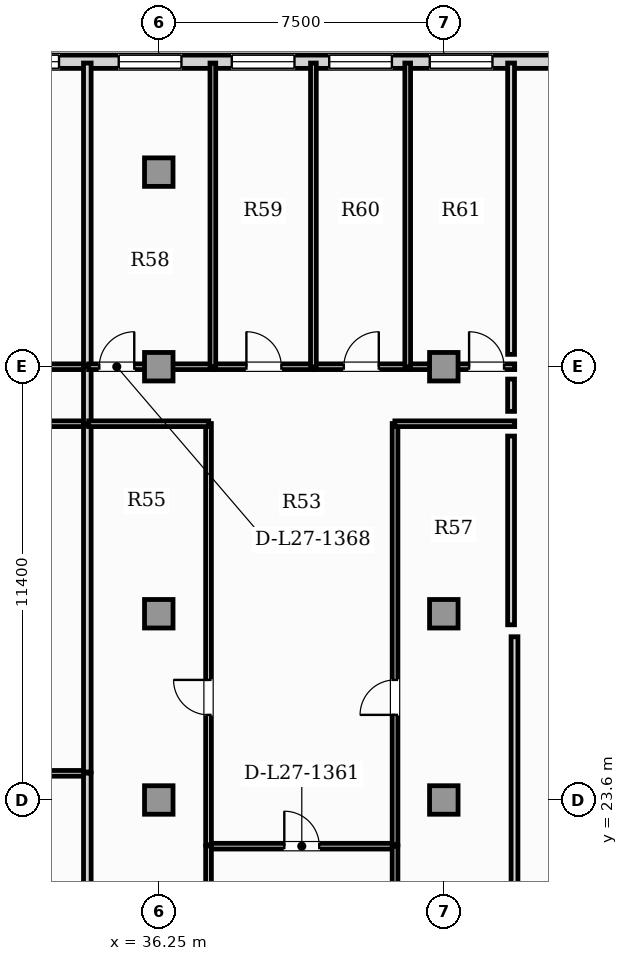
"""IFC4 building model, lengths in metres.
Left out: names, types, materials, properties, quantities, classifications, styles, units other than length and angle.
Written with IfcOpenShell. Run it as: python <this file> out.ifc"""

import sys

from ifc_helpers import new_model, si_unit, direction, frame, frame_2d, origin, origin_2d, place, context, subcontext, project, spatial, rectangle, extrude, element, fill, save


model = new_model("IFC4")
c1 = context("Model", 3, precision=1e-05, world=origin(), true_north=direction((0.0, 1.0)))
c2 = subcontext(c1, "Body", "Model", "MODEL_VIEW")
j1 = project(units=[si_unit("LENGTHUNIT", "METRE"), si_unit("PLANEANGLEUNIT", "RADIAN")], contexts=[c1])
p1 = place(None, origin())
s1 = spatial("IfcSite", under=j1, at=p1, CompositionType="ELEMENT")
p2 = place(p1, origin())
s2 = spatial("IfcBuilding", under=s1, at=p2, CompositionType="ELEMENT")
p3 = place(p2, frame((0.0, 0.0, 111.85)))
s3 = spatial("IfcBuildingStorey", under=s2, at=p3, CompositionType="ELEMENT", Elevation=111.85)
for number, where, z_axis, x_axis in (
    (1, (36.25, 23.6, 0.0), (0.0, 0.0, 1.0), (1.0, 0.0, 0.0)),
    (2, (43.75, 23.6, 0.0), (0.0, 0.0, 1.0), (1.0, 0.0, 0.0)),
    (3, (36.25, 28.5, 0.0), (0.0, 0.0, 1.0), (1.0, 0.0, 0.0)),
    (4, (43.75, 28.5, 0.0), (0.0, 0.0, 1.0), (1.0, 0.0, 0.0)),
    (5, (36.25, 40.12, 0.0), (0.0, 0.0, 1.0), (1.0, 0.0, 0.0)),
    (6, (36.25, 35.0, 0.0), (0.0, 0.0, 1.0), (1.0, 0.0, 0.0)),
    (7, (43.75, 35.0, 0.0), (0.0, 0.0, 1.0), (1.0, 0.0, 0.0)),
):
    element("IfcColumn", number, at=place(p3, frame(where, z_axis=z_axis, x_axis=x_axis)), inside=s3, PredefinedType="COLUMN", context=c2, shape_type="SweptSolid", body=[
        extrude(rectangle(XDim=0.75, YDim=0.75, at=origin_2d()), origin(), (0.0, 0.0, 1.0), 3.85),
    ])
p4 = place(p3, frame((51.66, 43.025, 0.0), z_axis=(0.0, 0.0, 1.0), x_axis=(-1.0, 0.0, 0.0)))
e8 = element("IfcWall", 8, at=p4, inside=s3, PredefinedType="SOLIDWALL", context=c2, shape_type="SweptSolid", body=[
    extrude(rectangle(XDim=45.82, YDim=0.35, at=frame_2d((22.91, 0.0))), origin(), (0.0, 0.0, 1.0), 3.6),
])
p5 = place(p4, frame((42.393, 0.0, 0.88)))
e9 = element("IfcOpeningElement", 9, at=p5, cuts=e8, PredefinedType="OPENING", context=c2, shape_type="SweptSolid", body=[
    extrude(rectangle(XDim=1.65, YDim=2.0, at=frame_2d((0.825, 1.0))), frame((0.0, 0.185, 0.0), z_axis=(0.0, -1.0, 0.0), x_axis=(1.0, 0.0, 0.0)), (0.0, 0.0, 1.0), 0.37),
])
p6 = place(p4, frame((1.778, 0.0, 0.88)))
e10 = element("IfcOpeningElement", 10, at=p6, cuts=e8, PredefinedType="OPENING", context=c2, shape_type="SweptSolid", body=[
    extrude(rectangle(XDim=1.65, YDim=2.0, at=frame_2d((0.825, 1.0))), frame((0.0, 0.185, 0.0), z_axis=(0.0, -1.0, 0.0), x_axis=(1.0, 0.0, 0.0)), (0.0, 0.0, 1.0), 0.37),
])
p7 = place(p4, frame((37.293, 0.0, 0.88)))
e11 = element("IfcOpeningElement", 11, at=p7, cuts=e8, PredefinedType="OPENING", context=c2, shape_type="SweptSolid", body=[
    extrude(rectangle(XDim=1.65, YDim=2.0, at=frame_2d((0.825, 1.0))), frame((0.0, 0.185, 0.0), z_axis=(0.0, -1.0, 0.0), x_axis=(1.0, 0.0, 0.0)), (0.0, 0.0, 1.0), 0.37),
])
p8 = place(p4, frame((34.694, 0.0, 0.95)))
e12 = element("IfcOpeningElement", 12, at=p8, cuts=e8, PredefinedType="OPENING", context=c2, shape_type="SweptSolid", body=[
    extrude(rectangle(XDim=0.9, YDim=1.5, at=frame_2d((0.45, 0.75))), frame((0.0, 0.185, 0.0), z_axis=(0.0, -1.0, 0.0), x_axis=(1.0, 0.0, 0.0)), (0.0, 0.0, 1.0), 0.37),
])
p9 = place(p4, frame((31.734, 0.0, 1.82)))
e13 = element("IfcOpeningElement", 13, at=p9, cuts=e8, PredefinedType="OPENING", context=c2, shape_type="SweptSolid", body=[
    extrude(rectangle(XDim=0.9, YDim=1.05, at=frame_2d((0.45, 0.525))), frame((0.0, 0.185, 0.0), z_axis=(0.0, -1.0, 0.0), x_axis=(1.0, 0.0, 0.0)), (0.0, 0.0, 1.0), 0.37),
])
p10 = place(p4, frame((29.11, 0.0, 0.88)))
e14 = element("IfcOpeningElement", 14, at=p10, cuts=e8, PredefinedType="OPENING", context=c2, shape_type="SweptSolid", body=[
    extrude(rectangle(XDim=1.65, YDim=2.0, at=frame_2d((0.825, 1.0))), frame((0.0, 0.185, 0.0), z_axis=(0.0, -1.0, 0.0), x_axis=(1.0, 0.0, 0.0)), (0.0, 0.0, 1.0), 0.37),
])
p11 = place(p4, frame((26.053, 0.0, 0.88)))
e15 = element("IfcOpeningElement", 15, at=p11, cuts=e8, PredefinedType="OPENING", context=c2, shape_type="SweptSolid", body=[
    extrude(rectangle(XDim=1.65, YDim=2.0, at=frame_2d((0.825, 1.0))), frame((0.0, 0.185, 0.0), z_axis=(0.0, -1.0, 0.0), x_axis=(1.0, 0.0, 0.0)), (0.0, 0.0, 1.0), 0.37),
])
p12 = place(p4, frame((23.243, 0.0, 0.88)))
e16 = element("IfcOpeningElement", 16, at=p12, cuts=e8, PredefinedType="OPENING", context=c2, shape_type="SweptSolid", body=[
    extrude(rectangle(XDim=1.65, YDim=2.0, at=frame_2d((0.825, 1.0))), frame((0.0, 0.185, 0.0), z_axis=(0.0, -1.0, 0.0), x_axis=(1.0, 0.0, 0.0)), (0.0, 0.0, 1.0), 0.37),
])
p13 = place(p4, frame((20.844, 0.0, 0.88)))
e17 = element("IfcOpeningElement", 17, at=p13, cuts=e8, PredefinedType="OPENING", context=c2, shape_type="SweptSolid", body=[
    extrude(rectangle(XDim=1.65, YDim=2.0, at=frame_2d((0.825, 1.0))), frame((0.0, 0.185, 0.0), z_axis=(0.0, -1.0, 0.0), x_axis=(1.0, 0.0, 0.0)), (0.0, 0.0, 1.0), 0.37),
])
p14 = place(p4, frame((18.034, 0.0, 0.88)))
e18 = element("IfcOpeningElement", 18, at=p14, cuts=e8, PredefinedType="OPENING", context=c2, shape_type="SweptSolid", body=[
    extrude(rectangle(XDim=1.65, YDim=2.0, at=frame_2d((0.825, 1.0))), frame((0.0, 0.185, 0.0), z_axis=(0.0, -1.0, 0.0), x_axis=(1.0, 0.0, 0.0)), (0.0, 0.0, 1.0), 0.37),
])
p15 = place(p4, frame((14.813, 0.0, 0.88)))
e19 = element("IfcOpeningElement", 19, at=p15, cuts=e8, PredefinedType="OPENING", context=c2, shape_type="SweptSolid", body=[
    extrude(rectangle(XDim=1.65, YDim=2.0, at=frame_2d((0.825, 1.0))), frame((0.0, 0.185, 0.0), z_axis=(0.0, -1.0, 0.0), x_axis=(1.0, 0.0, 0.0)), (0.0, 0.0, 1.0), 0.37),
])
p16 = place(p4, frame((11.839, 0.0, 0.88)))
e20 = element("IfcOpeningElement", 20, at=p16, cuts=e8, PredefinedType="OPENING", context=c2, shape_type="SweptSolid", body=[
    extrude(rectangle(XDim=1.65, YDim=2.0, at=frame_2d((0.825, 1.0))), frame((0.0, 0.185, 0.0), z_axis=(0.0, -1.0, 0.0), x_axis=(1.0, 0.0, 0.0)), (0.0, 0.0, 1.0), 0.37),
])
p17 = place(p4, frame((9.276, 0.0, 0.88)))
e21 = element("IfcOpeningElement", 21, at=p17, cuts=e8, PredefinedType="OPENING", context=c2, shape_type="SweptSolid", body=[
    extrude(rectangle(XDim=1.65, YDim=2.0, at=frame_2d((0.825, 1.0))), frame((0.0, 0.185, 0.0), z_axis=(0.0, -1.0, 0.0), x_axis=(1.0, 0.0, 0.0)), (0.0, 0.0, 1.0), 0.37),
])
p18 = place(p4, frame((6.63, 0.0, 0.88)))
e22 = element("IfcOpeningElement", 22, at=p18, cuts=e8, PredefinedType="OPENING", context=c2, shape_type="SweptSolid", body=[
    extrude(rectangle(XDim=1.65, YDim=2.0, at=frame_2d((0.825, 1.0))), frame((0.0, 0.185, 0.0), z_axis=(0.0, -1.0, 0.0), x_axis=(1.0, 0.0, 0.0)), (0.0, 0.0, 1.0), 0.37),
])
p19 = place(p3, frame((45.61, 17.225, 0.0), z_axis=(0.0, 0.0, 1.0), x_axis=(0.0, 1.0, 0.0)))
e23 = element("IfcWall", 23, at=p19, inside=s3, PredefinedType="PARTITIONING", context=c2, shape_type="SweptSolid", body=[
    extrude(rectangle(XDim=10.67, YDim=0.18, at=frame_2d((5.335, 0.0))), origin(), (0.0, 0.0, 1.0), 3.6),
])
p20 = place(p3, frame((31.153, 33.5, 0.0), z_axis=(0.0, 0.0, 1.0), x_axis=(1.0, 0.0, 0.0)))
e24 = element("IfcWall", 24, at=p20, inside=s3, PredefinedType="PARTITIONING", context=c2, shape_type="SweptSolid", body=[
    extrude(rectangle(XDim=3.222, YDim=0.15, at=frame_2d((1.611, 0.0))), origin(), (0.0, 0.0, 1.0), 3.6),
])
p21 = place(p3, frame((31.266, 35.0, 0.0), z_axis=(0.0, 0.0, 1.0), x_axis=(1.0, 0.0, 0.0)))
e25 = element("IfcWall", 25, at=p21, inside=s3, PredefinedType="PARTITIONING", context=c2, shape_type="SweptSolid", body=[
    extrude(rectangle(XDim=3.109, YDim=0.15, at=frame_2d((1.554, 0.0))), origin(), (0.0, 0.0, 1.0), 2.983),
])
p22 = place(p21, frame((1.094, 0.0, 0.0)))
e26 = element("IfcOpeningElement", 26, at=p22, cuts=e25, PredefinedType="OPENING", context=c2, shape_type="SweptSolid", body=[
    extrude(rectangle(XDim=0.92, YDim=2.1, at=frame_2d((0.46, 1.05))), frame((0.0, 0.085, 0.0), z_axis=(0.0, -1.0, 0.0), x_axis=(1.0, 0.0, 0.0)), (0.0, 0.0, 1.0), 0.17),
])
p23 = place(p3, frame((34.37, 33.495, 0.0), z_axis=(0.0, 0.0, 1.0), x_axis=(0.0, 1.0, 0.0)))
e27 = element("IfcWall", 27, at=p23, inside=s3, PredefinedType="PARTITIONING", context=c2, shape_type="SweptSolid", body=[
    extrude(rectangle(XDim=1.51, YDim=0.2, at=frame_2d((0.755, 0.0))), origin(), (0.0, 0.0, 1.0), 3.6),
])
p24 = place(p3, frame((31.153, 24.301, 0.0), z_axis=(0.0, 0.0, 1.0), x_axis=(1.0, 0.0, 0.0)))
e28 = element("IfcWall", 28, at=p24, inside=s3, PredefinedType="PARTITIONING", context=c2, shape_type="SweptSolid", body=[
    extrude(rectangle(XDim=3.222, YDim=0.15, at=frame_2d((1.611, 0.0))), origin(), (0.0, 0.0, 1.0), 3.6),
])
p25 = place(p3, frame((34.37, 17.151, 0.0), z_axis=(0.0, 0.0, 1.0), x_axis=(0.0, 1.0, 0.0)))
e29 = element("IfcWall", 29, at=p25, inside=s3, PredefinedType="PARTITIONING", context=c2, shape_type="SweptSolid", body=[
    extrude(rectangle(XDim=7.155, YDim=0.2, at=frame_2d((3.578, 0.0))), origin(), (0.0, 0.0, 1.0), 3.6),
])
p26 = place(p3, frame((34.37, 24.336, 0.0), z_axis=(0.0, 0.0, 1.0), x_axis=(0.0, 1.0, 0.0)))
e30 = element("IfcWall", 30, at=p26, inside=s3, PredefinedType="PARTITIONING", context=c2, shape_type="SweptSolid", body=[
    extrude(rectangle(XDim=9.129, YDim=0.2, at=frame_2d((4.564, 0.0))), origin(), (0.0, 0.0, 1.0), 3.6),
])
p27 = place(p3, frame((34.37, 35.035, 0.0), z_axis=(0.0, 0.0, 1.0), x_axis=(0.0, 1.0, 0.0)))
e31 = element("IfcWall", 31, at=p27, inside=s3, PredefinedType="PARTITIONING", context=c2, shape_type="SweptSolid", body=[
    extrude(rectangle(XDim=7.955, YDim=0.2, at=frame_2d((3.978, 0.0))), origin(), (0.0, 0.0, 1.0), 3.6),
])
p28 = place(p3, frame((37.554, 22.385, 0.0), z_axis=(0.0, 0.0, 1.0), x_axis=(1.0, 0.0, 0.0)))
e32 = element("IfcWall", 32, at=p28, inside=s3, PredefinedType="PARTITIONING", context=c2, shape_type="SweptSolid", body=[
    extrude(rectangle(XDim=4.917, YDim=0.15, at=frame_2d((2.459, 0.0))), origin(), (0.0, 0.0, 1.0), 3.6),
])
p29 = place(p28, frame((1.999, 0.0, 0.0)))
e33 = element("IfcOpeningElement", 33, at=p29, cuts=e32, PredefinedType="OPENING", context=c2, shape_type="SweptSolid", body=[
    extrude(rectangle(XDim=0.92, YDim=2.1, at=frame_2d((0.46, 1.05))), frame((0.0, 0.085, 0.0), z_axis=(0.0, -1.0, 0.0), x_axis=(1.0, 0.0, 0.0)), (0.0, 0.0, 1.0), 0.17),
])
p30 = place(p3, frame((37.559, 16.178, 0.0), z_axis=(0.0, 0.0, 1.0), x_axis=(0.0, 1.0, 0.0)))
e34 = element("IfcWall", 34, at=p30, inside=s3, PredefinedType="PARTITIONING", context=c2, shape_type="SweptSolid", body=[
    extrude(rectangle(XDim=6.211, YDim=0.15, at=frame_2d((3.105, 0.0))), origin(), (0.0, 0.0, 1.0), 3.6),
])
p31 = place(p30, frame((2.646, 0.0, 0.0)))
e35 = element("IfcOpeningElement", 35, at=p31, cuts=e34, PredefinedType="OPENING", context=c2, shape_type="SweptSolid", body=[
    extrude(rectangle(XDim=0.92, YDim=2.1, at=frame_2d((0.46, 1.05))), frame((0.0, 0.085, 0.0), z_axis=(0.0, -1.0, 0.0), x_axis=(1.0, 0.0, 0.0)), (0.0, 0.0, 1.0), 0.17),
])
p32 = place(p3, frame((42.467, 17.225, 0.0), z_axis=(0.0, 0.0, 1.0), x_axis=(0.0, 1.0, 0.0)))
e36 = element("IfcWall", 36, at=p32, inside=s3, PredefinedType="PARTITIONING", context=c2, shape_type="SweptSolid", body=[
    extrude(rectangle(XDim=5.165, YDim=0.15, at=frame_2d((2.583, 0.0))), origin(), (0.0, 0.0, 1.0), 3.6),
])
p33 = place(p32, frame((2.122, 0.0, 0.0)))
e37 = element("IfcOpeningElement", 37, at=p33, cuts=e36, PredefinedType="OPENING", context=c2, shape_type="SweptSolid", body=[
    extrude(rectangle(XDim=0.92, YDim=2.1, at=frame_2d((0.46, 1.05))), frame((0.0, 0.085, 0.0), z_axis=(0.0, -1.0, 0.0), x_axis=(1.0, 0.0, 0.0)), (0.0, 0.0, 1.0), 0.17),
])
p34 = place(p3, frame((37.559, 22.419, 0.0), z_axis=(0.0, 0.0, 1.0), x_axis=(0.0, 1.0, 0.0)))
e38 = element("IfcWall", 38, at=p34, inside=s3, PredefinedType="PARTITIONING", context=c2, shape_type="SweptSolid", body=[
    extrude(rectangle(XDim=11.085, YDim=0.15, at=frame_2d((5.543, 0.0))), origin(), (0.0, 0.0, 1.0), 3.6),
])
p35 = place(p34, frame((3.42, 0.0, 0.0)))
e39 = element("IfcOpeningElement", 39, at=p35, cuts=e38, PredefinedType="OPENING", context=c2, shape_type="SweptSolid", body=[
    extrude(rectangle(XDim=0.92, YDim=2.1, at=frame_2d((0.46, 1.05))), frame((0.0, 0.085, 0.0), z_axis=(0.0, -1.0, 0.0), x_axis=(1.0, 0.0, 0.0)), (0.0, 0.0, 1.0), 0.17),
])
p36 = place(p3, frame((34.405, 33.5, 0.0), z_axis=(0.0, 0.0, 1.0), x_axis=(1.0, 0.0, 0.0)))
e40 = element("IfcWall", 40, at=p36, inside=s3, PredefinedType="PARTITIONING", context=c2, shape_type="SweptSolid", body=[
    extrude(rectangle(XDim=3.159, YDim=0.15, at=frame_2d((1.58, 0.0))), origin(), (0.0, 0.0, 1.0), 3.6),
])
p37 = place(p3, frame((42.467, 22.419, 0.0), z_axis=(0.0, 0.0, 1.0), x_axis=(0.0, 1.0, 0.0)))
e41 = element("IfcWall", 41, at=p37, inside=s3, PredefinedType="PARTITIONING", context=c2, shape_type="SweptSolid", body=[
    extrude(rectangle(XDim=11.085, YDim=0.15, at=frame_2d((5.543, 0.0))), origin(), (0.0, 0.0, 1.0), 3.6),
])
p38 = place(p37, frame((3.42, 0.0, 0.0)))
e42 = element("IfcOpeningElement", 42, at=p38, cuts=e41, PredefinedType="OPENING", context=c2, shape_type="SweptSolid", body=[
    extrude(rectangle(XDim=0.92, YDim=2.1, at=frame_2d((0.46, 1.05))), frame((0.0, 0.085, 0.0), z_axis=(0.0, -1.0, 0.0), x_axis=(1.0, 0.0, 0.0)), (0.0, 0.0, 1.0), 0.17),
])
p39 = place(p3, frame((42.462, 33.5, 0.0), z_axis=(0.0, 0.0, 1.0), x_axis=(1.0, 0.0, 0.0)))
e43 = element("IfcWall", 43, at=p39, inside=s3, PredefinedType="PARTITIONING", context=c2, shape_type="SweptSolid", body=[
    extrude(rectangle(XDim=3.153, YDim=0.15, at=frame_2d((1.577, 0.0))), origin(), (0.0, 0.0, 1.0), 3.6),
])
p40 = place(p3, frame((34.405, 35.0, 0.0), z_axis=(0.0, 0.0, 1.0), x_axis=(1.0, 0.0, 0.0)))
e44 = element("IfcWall", 44, at=p40, inside=s3, PredefinedType="PARTITIONING", context=c2, shape_type="SweptSolid", body=[
    extrude(rectangle(XDim=3.273, YDim=0.15, at=frame_2d((1.636, 0.0))), origin(), (0.0, 0.0, 1.0), 2.983),
])
p41 = place(p40, frame((0.28, 0.0, 0.0)))
e45 = element("IfcOpeningElement", 45, at=p41, cuts=e44, PredefinedType="OPENING", context=c2, shape_type="SweptSolid", body=[
    extrude(rectangle(XDim=0.92, YDim=2.1, at=frame_2d((0.46, 1.05))), frame((0.0, 0.085, 0.0), z_axis=(0.0, -1.0, 0.0), x_axis=(1.0, 0.0, 0.0)), (0.0, 0.0, 1.0), 0.17),
])
p42 = place(p3, frame((37.708, 35.0, 0.0), z_axis=(0.0, 0.0, 1.0), x_axis=(1.0, 0.0, 0.0)))
e46 = element("IfcWall", 46, at=p42, inside=s3, PredefinedType="PARTITIONING", context=c2, shape_type="SweptSolid", body=[
    extrude(rectangle(XDim=2.616, YDim=0.15, at=frame_2d((1.308, 0.0))), origin(), (0.0, 0.0, 1.0), 2.983),
])
p43 = place(p42, frame((0.848, 0.0, 0.0)))
e47 = element("IfcOpeningElement", 47, at=p43, cuts=e46, PredefinedType="OPENING", context=c2, shape_type="SweptSolid", body=[
    extrude(rectangle(XDim=0.92, YDim=2.1, at=frame_2d((0.46, 1.05))), frame((0.0, 0.085, 0.0), z_axis=(0.0, -1.0, 0.0), x_axis=(1.0, 0.0, 0.0)), (0.0, 0.0, 1.0), 0.17),
])
p44 = place(p3, frame((40.354, 35.0, 0.0), z_axis=(0.0, 0.0, 1.0), x_axis=(1.0, 0.0, 0.0)))
e48 = element("IfcWall", 48, at=p44, inside=s3, PredefinedType="PARTITIONING", context=c2, shape_type="SweptSolid", body=[
    extrude(rectangle(XDim=2.451, YDim=0.15, at=frame_2d((1.226, 0.0))), origin(), (0.0, 0.0, 1.0), 2.983),
])
p45 = place(p44, frame((0.766, 0.0, 0.0)))
e49 = element("IfcOpeningElement", 49, at=p45, cuts=e48, PredefinedType="OPENING", context=c2, shape_type="SweptSolid", body=[
    extrude(rectangle(XDim=0.92, YDim=2.1, at=frame_2d((0.46, 1.05))), frame((0.0, 0.085, 0.0), z_axis=(0.0, -1.0, 0.0), x_axis=(1.0, 0.0, 0.0)), (0.0, 0.0, 1.0), 0.17),
])
p46 = place(p3, frame((42.835, 35.0, 0.0), z_axis=(0.0, 0.0, 1.0), x_axis=(1.0, 0.0, 0.0)))
e50 = element("IfcWall", 50, at=p46, inside=s3, PredefinedType="PARTITIONING", context=c2, shape_type="SweptSolid", body=[
    extrude(rectangle(XDim=2.78, YDim=0.15, at=frame_2d((1.39, 0.0))), origin(), (0.0, 0.0, 1.0), 2.983),
])
p47 = place(p46, frame((1.58, 0.0, 0.0)))
e51 = element("IfcOpeningElement", 51, at=p47, cuts=e50, PredefinedType="OPENING", context=c2, shape_type="SweptSolid", body=[
    extrude(rectangle(XDim=0.92, YDim=2.1, at=frame_2d((0.46, 1.05))), frame((0.0, 0.085, 0.0), z_axis=(0.0, -1.0, 0.0), x_axis=(1.0, 0.0, 0.0)), (0.0, 0.0, 1.0), 0.17),
])
for number, where, z_axis, x_axis in (
    (52, (37.673, 34.995, 0.0), (0.0, 0.0, 1.0), (0.0, 1.0, 0.0)),
    (53, (40.319, 34.995, 0.0), (0.0, 0.0, 1.0), (0.0, 1.0, 0.0)),
    (54, (42.8, 34.995, 0.0), (0.0, 0.0, 1.0), (0.0, 1.0, 0.0)),
):
    element("IfcWall", number, at=place(p3, frame(where, z_axis=z_axis, x_axis=x_axis)), inside=s3, PredefinedType="PARTITIONING", context=c2, shape_type="SweptSolid", body=[
        extrude(rectangle(XDim=7.995, YDim=0.15, at=frame_2d((3.998, 0.0))), origin(), (0.0, 0.0, 1.0), 3.6),
    ])
p48 = place(p3, frame((45.52, 34.675, 0.0), z_axis=(0.0, 0.0, 1.0), x_axis=(0.0, -1.0, 0.0)))
e55 = element("IfcWall", 55, at=p48, inside=s3, PredefinedType="PARTITIONING", context=c2, shape_type="SweptSolid", body=[
    extrude(rectangle(XDim=0.85, YDim=0.18, at=frame_2d((0.425, 0.0))), origin(), (0.0, 0.0, 1.0), 3.6),
])
p49 = place(p3, frame((45.52, 33.175, 0.0), z_axis=(0.0, 0.0, 1.0), x_axis=(0.0, -1.0, 0.0)))
e56 = element("IfcWall", 56, at=p49, inside=s3, PredefinedType="PARTITIONING", context=c2, shape_type="SweptSolid", body=[
    extrude(rectangle(XDim=4.965, YDim=0.18, at=frame_2d((2.482, 0.0))), origin(), (0.0, 0.0, 1.0), 3.6),
])
p50 = place(p3, frame((45.52, 42.99, 0.0), z_axis=(0.0, 0.0, 1.0), x_axis=(0.0, -1.0, 0.0)))
e57 = element("IfcWall", 57, at=p50, inside=s3, PredefinedType="PARTITIONING", context=c2, shape_type="SweptSolid", body=[
    extrude(rectangle(XDim=7.665, YDim=0.18, at=frame_2d((3.833, 0.0))), origin(), (0.0, 0.0, 1.0), 3.6),
])
p51 = place(p14, origin())
e58 = element("IfcWindow", 58, at=p51, inside=s3, PartitioningType="SINGLE_PANEL", PredefinedType="WINDOW", context=c2, shape_type="SweptSolid", body=[
    extrude(rectangle(XDim=1.65, YDim=2.0, at=frame_2d((0.825, 1.0))), frame((0.0, 0.03, 0.0), z_axis=(0.0, -1.0, 0.0), x_axis=(1.0, 0.0, 0.0)), (0.0, 0.0, 1.0), 0.06),
])
fill(e18, e58)
p52 = place(p15, origin())
e59 = element("IfcWindow", 59, at=p52, inside=s3, PartitioningType="SINGLE_PANEL", PredefinedType="WINDOW", context=c2, shape_type="SweptSolid", body=[
    extrude(rectangle(XDim=1.65, YDim=2.0, at=frame_2d((0.825, 1.0))), frame((0.0, 0.03, 0.0), z_axis=(0.0, -1.0, 0.0), x_axis=(1.0, 0.0, 0.0)), (0.0, 0.0, 1.0), 0.06),
])
fill(e19, e59)
p53 = place(p16, origin())
e60 = element("IfcWindow", 60, at=p53, inside=s3, PartitioningType="SINGLE_PANEL", PredefinedType="WINDOW", context=c2, shape_type="SweptSolid", body=[
    extrude(rectangle(XDim=1.65, YDim=2.0, at=frame_2d((0.825, 1.0))), frame((0.0, 0.03, 0.0), z_axis=(0.0, -1.0, 0.0), x_axis=(1.0, 0.0, 0.0)), (0.0, 0.0, 1.0), 0.06),
])
fill(e20, e60)
p54 = place(p17, origin())
e61 = element("IfcWindow", 61, at=p54, inside=s3, PartitioningType="SINGLE_PANEL", PredefinedType="WINDOW", context=c2, shape_type="SweptSolid", body=[
    extrude(rectangle(XDim=1.65, YDim=2.0, at=frame_2d((0.825, 1.0))), frame((0.0, 0.03, 0.0), z_axis=(0.0, -1.0, 0.0), x_axis=(1.0, 0.0, 0.0)), (0.0, 0.0, 1.0), 0.06),
])
fill(e21, e61)
p55 = place(p18, origin())
e62 = element("IfcWindow", 62, at=p55, inside=s3, PartitioningType="SINGLE_PANEL", PredefinedType="WINDOW", context=c2, shape_type="SweptSolid", body=[
    extrude(rectangle(XDim=1.65, YDim=2.0, at=frame_2d((0.825, 1.0))), frame((0.0, 0.03, 0.0), z_axis=(0.0, -1.0, 0.0), x_axis=(1.0, 0.0, 0.0)), (0.0, 0.0, 1.0), 0.06),
])
fill(e22, e62)
p56 = place(p29, origin())
e63 = element("IfcDoor", 63, at=p56, inside=s3, OperationType="SINGLE_SWING_LEFT", PredefinedType="DOOR", context=c2, shape_type="SweptSolid", body=[
    extrude(rectangle(XDim=0.92, YDim=2.1, at=frame_2d((0.46, 1.05))), frame((0.0, 0.025, 0.0), z_axis=(0.0, -1.0, 0.0), x_axis=(1.0, 0.0, 0.0)), (0.0, 0.0, 1.0), 0.05),
])
fill(e33, e63)
p57 = place(p35, origin())
e64 = element("IfcDoor", 64, at=p57, inside=s3, OperationType="SINGLE_SWING_RIGHT", PredefinedType="DOOR", context=c2, shape_type="SweptSolid", body=[
    extrude(rectangle(XDim=0.92, YDim=2.1, at=frame_2d((0.46, 1.05))), frame((0.0, 0.025, 0.0), z_axis=(0.0, -1.0, 0.0), x_axis=(1.0, 0.0, 0.0)), (0.0, 0.0, 1.0), 0.05),
])
fill(e39, e64)
p58 = place(p38, origin())
e65 = element("IfcDoor", 65, at=p58, inside=s3, OperationType="SINGLE_SWING_LEFT", PredefinedType="DOOR", context=c2, shape_type="SweptSolid", body=[
    extrude(rectangle(XDim=0.92, YDim=2.1, at=frame_2d((0.46, 1.05))), frame((0.0, 0.025, 0.0), z_axis=(0.0, -1.0, 0.0), x_axis=(1.0, 0.0, 0.0)), (0.0, 0.0, 1.0), 0.05),
])
fill(e42, e65)
p59 = place(p41, origin())
e66 = element("IfcDoor", 66, at=p59, inside=s3, OperationType="SINGLE_SWING_RIGHT", PredefinedType="DOOR", context=c2, shape_type="SweptSolid", body=[
    extrude(rectangle(XDim=0.92, YDim=2.1, at=frame_2d((0.46, 1.05))), frame((0.0, 0.025, 0.0), z_axis=(0.0, -1.0, 0.0), x_axis=(1.0, 0.0, 0.0)), (0.0, 0.0, 1.0), 0.05),
])
fill(e45, e66)
p60 = place(p43, origin())
e67 = element("IfcDoor", 67, at=p60, inside=s3, OperationType="SINGLE_SWING_LEFT", PredefinedType="DOOR", context=c2, shape_type="SweptSolid", body=[
    extrude(rectangle(XDim=0.92, YDim=2.1, at=frame_2d((0.46, 1.05))), frame((0.0, 0.025, 0.0), z_axis=(0.0, -1.0, 0.0), x_axis=(1.0, 0.0, 0.0)), (0.0, 0.0, 1.0), 0.05),
])
fill(e47, e67)
p61 = place(p45, origin())
e68 = element("IfcDoor", 68, at=p61, inside=s3, OperationType="SINGLE_SWING_RIGHT", PredefinedType="DOOR", context=c2, shape_type="SweptSolid", body=[
    extrude(rectangle(XDim=0.92, YDim=2.1, at=frame_2d((0.46, 1.05))), frame((0.0, 0.025, 0.0), z_axis=(0.0, -1.0, 0.0), x_axis=(1.0, 0.0, 0.0)), (0.0, 0.0, 1.0), 0.05),
])
fill(e49, e68)
p62 = place(p47, origin())
e69 = element("IfcDoor", 69, at=p62, inside=s3, OperationType="SINGLE_SWING_LEFT", PredefinedType="DOOR", context=c2, shape_type="SweptSolid", body=[
    extrude(rectangle(XDim=0.92, YDim=2.1, at=frame_2d((0.46, 1.05))), frame((0.0, 0.025, 0.0), z_axis=(0.0, -1.0, 0.0), x_axis=(1.0, 0.0, 0.0)), (0.0, 0.0, 1.0), 0.05),
])
fill(e51, e69)
save(model, sys.argv[1])
